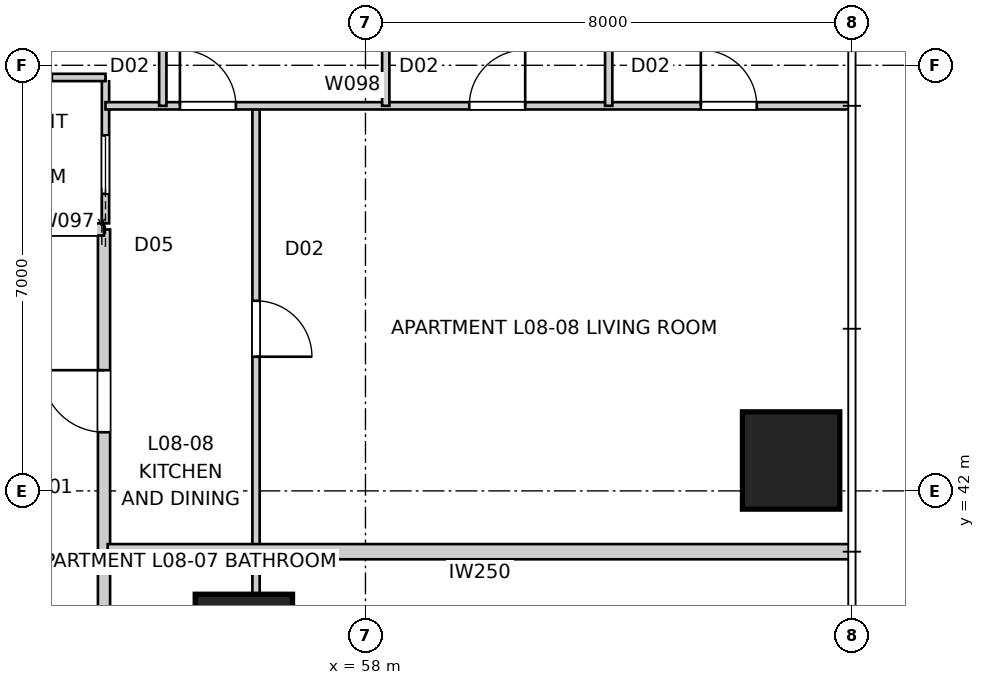
"""IFC4 building model, lengths in metres.
Left out: names, types, materials, properties, quantities, classifications, styles, units other than length and angle.
Written with IfcOpenShell. Run it as: python <this file> out.ifc"""

import sys

from ifc_helpers import new_model, si_unit, direction, frame, frame_2d, origin, origin_2d, place, context, subcontext, project, spatial, rectangle, extrude, element, fill, save


model = new_model("IFC4")
c1 = context("Model", 3, precision=1e-05, world=origin(), true_north=direction((0.0, 1.0)))
c2 = subcontext(c1, "Body", "Model", "MODEL_VIEW")
j1 = project(units=[si_unit("LENGTHUNIT", "METRE"), si_unit("PLANEANGLEUNIT", "RADIAN")], contexts=[c1])
p1 = place(None, origin())
s1 = spatial("IfcSite", under=j1, at=p1, CompositionType="ELEMENT")
p2 = place(p1, origin())
s2 = spatial("IfcBuilding", under=s1, at=p2, CompositionType="ELEMENT")
p3 = place(p2, frame((0.0, 0.0, 32.0)))
s3 = spatial("IfcBuildingStorey", under=s2, at=p3, CompositionType="ELEMENT", Elevation=32.0)
for number, where, z_axis, x_axis in (
    (1, (65.0, 42.5, 0.0), (0.0, 0.0, 1.0), (1.0, 0.0, 0.0)),
    (2, (56.0, 39.5, 0.0), (0.0, 0.0, 1.0), (1.0, 0.0, 0.0)),
):
    element("IfcColumn", number, at=place(p3, frame(where, z_axis=z_axis, x_axis=x_axis)), inside=s3, PredefinedType="COLUMN", context=c2, shape_type="SweptSolid", body=[
        extrude(rectangle(XDim=1.6, YDim=1.6, at=origin_2d()), origin(), (0.0, 0.0, 1.0), 3.4),
    ])
p4 = place(p3, frame((53.7, 13.7, 0.0), z_axis=(0.0, 0.0, 1.0), x_axis=(0.0, 1.0, 0.0)))
e3 = element("IfcWall", 3, at=p4, inside=s3, PredefinedType="PARTITIONING", context=c2, shape_type="SweptSolid", body=[
    extrude(rectangle(XDim=32.6, YDim=0.2, at=frame_2d((16.3, 0.0))), origin(), (0.0, 0.0, 1.0), 3.25),
])
p5 = place(p4, frame((2.315, 0.0, 0.0)))
e4 = element("IfcOpeningElement", 4, at=p5, cuts=e3, PredefinedType="OPENING", context=c2, shape_type="SweptSolid", body=[
    extrude(rectangle(XDim=1.02, YDim=2.34, at=frame_2d((0.51, 1.17))), frame((0.0, 0.11, 0.0), z_axis=(0.0, -1.0, 0.0), x_axis=(1.0, 0.0, 0.0)), (0.0, 0.0, 1.0), 0.22),
])
p6 = place(p4, frame((29.265, 0.0, 0.0)))
e5 = element("IfcOpeningElement", 5, at=p6, cuts=e3, PredefinedType="OPENING", context=c2, shape_type="SweptSolid", body=[
    extrude(rectangle(XDim=1.02, YDim=2.34, at=frame_2d((0.51, 1.17))), frame((0.0, 0.11, 0.0), z_axis=(0.0, -1.0, 0.0), x_axis=(1.0, 0.0, 0.0)), (0.0, 0.0, 1.0), 0.22),
])
p7 = place(p4, frame((20.646, 0.0, 0.0)))
e6 = element("IfcOpeningElement", 6, at=p7, cuts=e3, PredefinedType="OPENING", context=c2, shape_type="SweptSolid", body=[
    extrude(rectangle(XDim=1.02, YDim=2.34, at=frame_2d((0.51, 1.17))), frame((0.0, 0.11, 0.0), z_axis=(0.0, -1.0, 0.0), x_axis=(1.0, 0.0, 0.0)), (0.0, 0.0, 1.0), 0.22),
])
p8 = place(p4, frame((13.626, 0.0, 0.0)))
e7 = element("IfcOpeningElement", 7, at=p8, cuts=e3, PredefinedType="OPENING", context=c2, shape_type="SweptSolid", body=[
    extrude(rectangle(XDim=1.02, YDim=2.34, at=frame_2d((0.51, 1.17))), frame((0.0, 0.11, 0.0), z_axis=(0.0, -1.0, 0.0), x_axis=(1.0, 0.0, 0.0)), (0.0, 0.0, 1.0), 0.22),
])
p9 = place(p3, frame((53.7, 46.3, 0.0), z_axis=(0.0, 0.0, 1.0), x_axis=(-1.0, 0.0, 0.0)))
e8 = element("IfcWall", 8, at=p9, inside=s3, PredefinedType="PARTITIONING", context=c2, shape_type="SweptSolid", body=[
    extrude(rectangle(XDim=4.458, YDim=0.2, at=frame_2d((2.229, 0.0))), origin(), (0.0, 0.0, 1.0), 3.25),
])
p10 = place(p3, frame((66.0, 41.0, 0.0), z_axis=(0.0, 0.0, 1.0), x_axis=(-1.0, 0.0, 0.0)))
e9 = element("IfcWall", 9, at=p10, inside=s3, PredefinedType="PARTITIONING", context=c2, shape_type="SweptSolid", body=[
    extrude(rectangle(XDim=12.24, YDim=0.25, at=frame_2d((6.12, 0.0))), origin(), (0.0, 0.0, 1.0), 3.25),
])
p11 = place(p3, frame((56.2, 48.333, 0.0), z_axis=(0.0, 0.0, 1.0), x_axis=(0.0, -1.0, 0.0)))
e10 = element("IfcWall", 10, at=p11, inside=s3, PredefinedType="PARTITIONING", context=c2, shape_type="SweptSolid", body=[
    extrude(rectangle(XDim=36.667, YDim=0.12, at=frame_2d((18.333, 0.0))), origin(), (0.0, 0.0, 1.0), 2.55),
])
p12 = place(p11, frame((31.573, 0.0, 0.0)))
e11 = element("IfcOpeningElement", 11, at=p12, cuts=e10, PredefinedType="OPENING", context=c2, shape_type="SweptSolid", body=[
    extrude(rectangle(XDim=0.92, YDim=2.34, at=frame_2d((0.46, 1.17))), frame((0.0, 0.07, 0.0), z_axis=(0.0, -1.0, 0.0), x_axis=(1.0, 0.0, 0.0)), (0.0, 0.0, 1.0), 0.14),
])
p13 = place(p11, frame((3.207, 0.0, 0.0)))
e12 = element("IfcOpeningElement", 12, at=p13, cuts=e10, PredefinedType="OPENING", context=c2, shape_type="SweptSolid", body=[
    extrude(rectangle(XDim=0.92, YDim=2.34, at=frame_2d((0.46, 1.17))), frame((0.0, 0.07, 0.0), z_axis=(0.0, -1.0, 0.0), x_axis=(1.0, 0.0, 0.0)), (0.0, 0.0, 1.0), 0.14),
])
p14 = place(p11, frame((12.542, 0.0, 0.0)))
e13 = element("IfcOpeningElement", 13, at=p14, cuts=e10, PredefinedType="OPENING", context=c2, shape_type="SweptSolid", body=[
    extrude(rectangle(XDim=0.92, YDim=2.34, at=frame_2d((0.46, 1.17))), frame((0.0, 0.07, 0.0), z_axis=(0.0, -1.0, 0.0), x_axis=(1.0, 0.0, 0.0)), (0.0, 0.0, 1.0), 0.14),
])
p15 = place(p11, frame((19.732, 0.0, 0.0)))
e14 = element("IfcOpeningElement", 14, at=p15, cuts=e10, PredefinedType="OPENING", context=c2, shape_type="SweptSolid", body=[
    extrude(rectangle(XDim=0.92, YDim=2.34, at=frame_2d((0.46, 1.17))), frame((0.0, 0.07, 0.0), z_axis=(0.0, -1.0, 0.0), x_axis=(1.0, 0.0, 0.0)), (0.0, 0.0, 1.0), 0.14),
])
p16 = place(p11, frame((9.762, 0.0, 0.0)))
e15 = element("IfcOpeningElement", 15, at=p16, cuts=e10, PredefinedType="OPENING", context=c2, shape_type="SweptSolid", body=[
    extrude(rectangle(XDim=0.96, YDim=2.1, at=frame_2d((0.48, 1.05))), frame((0.0, 0.07, 0.0), z_axis=(0.0, -1.0, 0.0), x_axis=(1.0, 0.0, 0.0)), (0.0, 0.0, 1.0), 0.14),
])
p17 = place(p11, frame((16.52, 0.0, 0.0)))
e16 = element("IfcOpeningElement", 16, at=p17, cuts=e10, PredefinedType="OPENING", context=c2, shape_type="SweptSolid", body=[
    extrude(rectangle(XDim=0.96, YDim=2.1, at=frame_2d((0.48, 1.05))), frame((0.0, 0.07, 0.0), z_axis=(0.0, -1.0, 0.0), x_axis=(1.0, 0.0, 0.0)), (0.0, 0.0, 1.0), 0.14),
])
p18 = place(p11, frame((23.709, 0.0, 0.0)))
e17 = element("IfcOpeningElement", 17, at=p18, cuts=e10, PredefinedType="OPENING", context=c2, shape_type="SweptSolid", body=[
    extrude(rectangle(XDim=0.96, YDim=2.1, at=frame_2d((0.48, 1.05))), frame((0.0, 0.07, 0.0), z_axis=(0.0, -1.0, 0.0), x_axis=(1.0, 0.0, 0.0)), (0.0, 0.0, 1.0), 0.14),
])
p19 = place(p3, frame((53.724, 46.4, 0.0), z_axis=(0.0, 0.0, 1.0), x_axis=(0.0, 1.0, 0.0)))
e18 = element("IfcWall", 18, at=p19, inside=s3, PredefinedType="PARTITIONING", context=c2, shape_type="SweptSolid", body=[
    extrude(rectangle(XDim=2.4, YDim=0.12, at=frame_2d((1.2, 0.0))), origin(), (0.0, 0.0, 1.0), 3.25),
])
p20 = place(p19, frame((0.487, 0.0, 0.0)))
e19 = element("IfcOpeningElement", 19, at=p20, cuts=e18, PredefinedType="OPENING", context=c2, shape_type="SweptSolid", body=[
    extrude(rectangle(XDim=0.96, YDim=2.1, at=frame_2d((0.48, 1.05))), frame((0.0, 0.07, 0.0), z_axis=(0.0, -1.0, 0.0), x_axis=(1.0, 0.0, 0.0)), (0.0, 0.0, 1.0), 0.14),
])
p21 = place(p3, frame((53.724, 48.333, 0.0), z_axis=(0.0, 0.0, 1.0), x_axis=(1.0, 0.0, 0.0)))
e20 = element("IfcWall", 20, at=p21, inside=s3, PredefinedType="PARTITIONING", context=c2, shape_type="SweptSolid", body=[
    extrude(rectangle(XDim=12.236, YDim=0.12, at=frame_2d((6.118, 0.0))), origin(), (0.0, 0.0, 1.0), 3.25),
])
p22 = place(p21, frame((1.224, 0.0, 0.0)))
e21 = element("IfcOpeningElement", 21, at=p22, cuts=e20, PredefinedType="OPENING", context=c2, shape_type="SweptSolid", body=[
    extrude(rectangle(XDim=0.92, YDim=2.34, at=frame_2d((0.46, 1.17))), frame((0.0, 0.07, 0.0), z_axis=(0.0, -1.0, 0.0), x_axis=(1.0, 0.0, 0.0)), (0.0, 0.0, 1.0), 0.14),
])
p23 = place(p21, frame((9.791, 0.0, 0.0)))
e22 = element("IfcOpeningElement", 22, at=p23, cuts=e20, PredefinedType="OPENING", context=c2, shape_type="SweptSolid", body=[
    extrude(rectangle(XDim=0.92, YDim=2.34, at=frame_2d((0.46, 1.17))), frame((0.0, 0.07, 0.0), z_axis=(0.0, -1.0, 0.0), x_axis=(1.0, 0.0, 0.0)), (0.0, 0.0, 1.0), 0.14),
])
p24 = place(p21, frame((5.982, 0.0, 0.0)))
e23 = element("IfcOpeningElement", 23, at=p24, cuts=e20, PredefinedType="OPENING", context=c2, shape_type="SweptSolid", body=[
    extrude(rectangle(XDim=0.92, YDim=2.34, at=frame_2d((0.46, 1.17))), frame((0.0, 0.07, 0.0), z_axis=(0.0, -1.0, 0.0), x_axis=(1.0, 0.0, 0.0)), (0.0, 0.0, 1.0), 0.14),
])
p25 = place(p3, frame((26.315, 48.8, 0.0), z_axis=(0.0, 0.0, 1.0), x_axis=(1.0, 0.0, 0.0)))
e24 = element("IfcWall", 24, at=p25, inside=s3, PredefinedType="PARTITIONING", context=c2, shape_type="SweptSolid", body=[
    extrude(rectangle(XDim=27.41, YDim=0.12, at=frame_2d((13.705, 0.0))), origin(), (0.0, 0.0, 1.0), 3.25),
])
p26 = place(p25, frame((18.725, 0.0, 0.0)))
e25 = element("IfcOpeningElement", 25, at=p26, cuts=e24, PredefinedType="OPENING", context=c2, shape_type="SweptSolid", body=[
    extrude(rectangle(XDim=0.92, YDim=2.34, at=frame_2d((0.46, 1.17))), frame((0.0, 0.07, 0.0), z_axis=(0.0, -1.0, 0.0), x_axis=(1.0, 0.0, 0.0)), (0.0, 0.0, 1.0), 0.14),
])
p27 = place(p25, frame((22.367, 0.0, 0.0)))
e26 = element("IfcOpeningElement", 26, at=p27, cuts=e24, PredefinedType="OPENING", context=c2, shape_type="SweptSolid", body=[
    extrude(rectangle(XDim=0.92, YDim=2.34, at=frame_2d((0.46, 1.17))), frame((0.0, 0.07, 0.0), z_axis=(0.0, -1.0, 0.0), x_axis=(1.0, 0.0, 0.0)), (0.0, 0.0, 1.0), 0.14),
])
p28 = place(p25, frame((15.903, 0.0, 0.0)))
e27 = element("IfcOpeningElement", 27, at=p28, cuts=e24, PredefinedType="OPENING", context=c2, shape_type="SweptSolid", body=[
    extrude(rectangle(XDim=0.92, YDim=2.34, at=frame_2d((0.46, 1.17))), frame((0.0, 0.07, 0.0), z_axis=(0.0, -1.0, 0.0), x_axis=(1.0, 0.0, 0.0)), (0.0, 0.0, 1.0), 0.14),
])
p29 = place(p25, frame((25.567, 0.0, 0.0)))
e28 = element("IfcOpeningElement", 28, at=p29, cuts=e24, PredefinedType="OPENING", context=c2, shape_type="SweptSolid", body=[
    extrude(rectangle(XDim=0.96, YDim=2.1, at=frame_2d((0.48, 1.05))), frame((0.0, 0.07, 0.0), z_axis=(0.0, -1.0, 0.0), x_axis=(1.0, 0.0, 0.0)), (0.0, 0.0, 1.0), 0.14),
])
p30 = place(p25, frame((0.863, 0.0, 0.0)))
e29 = element("IfcOpeningElement", 29, at=p30, cuts=e24, PredefinedType="OPENING", context=c2, shape_type="SweptSolid", body=[
    extrude(rectangle(XDim=0.96, YDim=2.1, at=frame_2d((0.48, 1.05))), frame((0.0, 0.07, 0.0), z_axis=(0.0, -1.0, 0.0), x_axis=(1.0, 0.0, 0.0)), (0.0, 0.0, 1.0), 0.14),
])
p31 = place(p25, frame((7.503, 0.0, 0.0)))
e30 = element("IfcOpeningElement", 30, at=p31, cuts=e24, PredefinedType="OPENING", context=c2, shape_type="SweptSolid", body=[
    extrude(rectangle(XDim=0.96, YDim=2.1, at=frame_2d((0.48, 1.05))), frame((0.0, 0.07, 0.0), z_axis=(0.0, -1.0, 0.0), x_axis=(1.0, 0.0, 0.0)), (0.0, 0.0, 1.0), 0.14),
])
p32 = place(p3, frame((58.333, 48.333, 0.0), z_axis=(0.0, 0.0, 1.0), x_axis=(0.0, 1.0, 0.0)))
e31 = element("IfcWall", 31, at=p32, inside=s3, PredefinedType="PARTITIONING", context=c2, shape_type="SweptSolid", body=[
    extrude(rectangle(XDim=7.627, YDim=0.12, at=frame_2d((3.813, 0.0))), origin(), (0.0, 0.0, 1.0), 3.25),
])
p33 = place(p3, frame((62.0, 51.96, 0.0), z_axis=(0.0, 0.0, 1.0), x_axis=(0.0, -1.0, 0.0)))
e32 = element("IfcWall", 32, at=p33, inside=s3, PredefinedType="PARTITIONING", context=c2, shape_type="SweptSolid", body=[
    extrude(rectangle(XDim=3.627, YDim=0.12, at=frame_2d((1.813, 0.0))), origin(), (0.0, 0.0, 1.0), 3.25),
])
p34 = place(p3, frame((54.667, 48.333, 0.0), z_axis=(0.0, 0.0, 1.0), x_axis=(0.0, 1.0, 0.0)))
e33 = element("IfcWall", 33, at=p34, inside=s3, PredefinedType="PARTITIONING", context=c2, shape_type="SweptSolid", body=[
    extrude(rectangle(XDim=7.627, YDim=0.12, at=frame_2d((3.813, 0.0))), origin(), (0.0, 0.0, 1.0), 2.638),
])
p35 = place(p6, origin())
e34 = element("IfcDoor", 34, at=p35, inside=s3, OperationType="SINGLE_SWING_RIGHT", PredefinedType="DOOR", context=c2, shape_type="SweptSolid", body=[
    extrude(rectangle(XDim=1.02, YDim=2.34, at=frame_2d((0.51, 1.17))), frame((0.0, 0.025, 0.0), z_axis=(0.0, -1.0, 0.0), x_axis=(1.0, 0.0, 0.0)), (0.0, 0.0, 1.0), 0.05),
])
fill(e5, e34)
p36 = place(p13, origin())
e35 = element("IfcDoor", 35, at=p36, inside=s3, OperationType="SINGLE_SWING_RIGHT", PredefinedType="DOOR", context=c2, shape_type="SweptSolid", body=[
    extrude(rectangle(XDim=0.92, YDim=2.34, at=frame_2d((0.46, 1.17))), frame((0.0, 0.025, 0.0), z_axis=(0.0, -1.0, 0.0), x_axis=(1.0, 0.0, 0.0)), (0.0, 0.0, 1.0), 0.05),
])
fill(e12, e35)
p37 = place(p20, origin())
e36 = element("IfcDoor", 36, at=p37, inside=s3, OperationType="SLIDING_TO_LEFT", PredefinedType="DOOR", context=c2, shape_type="SweptSolid", body=[
    extrude(rectangle(XDim=0.96, YDim=2.1, at=frame_2d((0.48, 1.05))), frame((0.0, 0.025, 0.0), z_axis=(0.0, -1.0, 0.0), x_axis=(1.0, 0.0, 0.0)), (0.0, 0.0, 1.0), 0.05),
])
fill(e19, e36)
p38 = place(p22, origin())
e37 = element("IfcDoor", 37, at=p38, inside=s3, OperationType="SINGLE_SWING_LEFT", PredefinedType="DOOR", context=c2, shape_type="SweptSolid", body=[
    extrude(rectangle(XDim=0.92, YDim=2.34, at=frame_2d((0.46, 1.17))), frame((0.0, 0.025, 0.0), z_axis=(0.0, -1.0, 0.0), x_axis=(1.0, 0.0, 0.0)), (0.0, 0.0, 1.0), 0.05),
])
fill(e21, e37)
p39 = place(p23, origin())
e38 = element("IfcDoor", 38, at=p39, inside=s3, OperationType="SINGLE_SWING_LEFT", PredefinedType="DOOR", context=c2, shape_type="SweptSolid", body=[
    extrude(rectangle(XDim=0.92, YDim=2.34, at=frame_2d((0.46, 1.17))), frame((0.0, 0.025, 0.0), z_axis=(0.0, -1.0, 0.0), x_axis=(1.0, 0.0, 0.0)), (0.0, 0.0, 1.0), 0.05),
])
fill(e22, e38)
p40 = place(p24, origin())
e39 = element("IfcDoor", 39, at=p40, inside=s3, OperationType="SINGLE_SWING_RIGHT", PredefinedType="DOOR", context=c2, shape_type="SweptSolid", body=[
    extrude(rectangle(XDim=0.92, YDim=2.34, at=frame_2d((0.46, 1.17))), frame((0.0, 0.025, 0.0), z_axis=(0.0, -1.0, 0.0), x_axis=(1.0, 0.0, 0.0)), (0.0, 0.0, 1.0), 0.05),
])
fill(e23, e39)
save(model, sys.argv[1])
